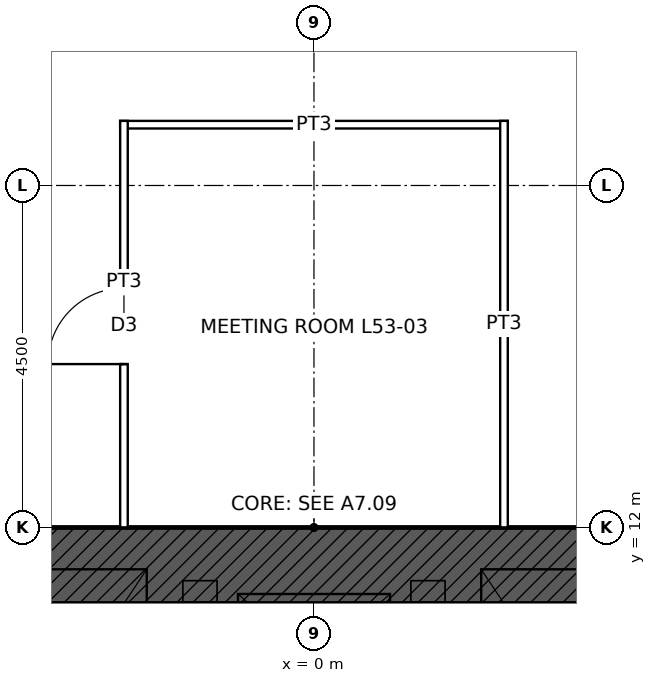
"""IFC4 building model, lengths in metres.
Left out: names, types, materials, properties, quantities, classifications, styles, units other than length and angle.
Written with IfcOpenShell. Run it as: python <this file> out.ifc"""

import sys

from ifc_helpers import new_model, si_unit, direction, frame, frame_2d, origin, place, context, subcontext, project, spatial, rectangle, extrude, element, fill, save


model = new_model("IFC4")
c1 = context("Model", 3, precision=1e-05, world=origin(), true_north=direction((0.0, 1.0)))
c2 = subcontext(c1, "Body", "Model", "MODEL_VIEW")
j1 = project(units=[si_unit("LENGTHUNIT", "METRE"), si_unit("PLANEANGLEUNIT", "RADIAN")], contexts=[c1])
p1 = place(None, origin())
s1 = spatial("IfcSite", under=j1, at=p1, CompositionType="ELEMENT")
p2 = place(p1, origin())
s2 = spatial("IfcBuilding", under=s1, at=p2, CompositionType="ELEMENT")
p3 = place(p2, frame((0.0, 0.0, 245.9)))
s3 = spatial("IfcBuildingStorey", under=s2, at=p3, CompositionType="ELEMENT", Elevation=245.9)
p4 = place(p3, frame((-12.0, 11.5, 0.0), z_axis=(0.0, 0.0, 1.0), x_axis=(1.0, 0.0, 0.0)))
e1 = element("IfcWall", 1, at=p4, inside=s3, PredefinedType="SHEAR", context=c2, shape_type="SweptSolid", body=[
    extrude(rectangle(XDim=24.0, YDim=1.0, at=frame_2d((12.0, 0.0))), origin(), (0.0, 0.0, 1.0), 4.0),
])
p5 = place(p4, frame((6.25, 0.0, 0.0)))
e2 = element("IfcOpeningElement", 2, at=p5, cuts=e1, PredefinedType="OPENING", context=c2, shape_type="SweptSolid", body=[
    extrude(rectangle(XDim=1.0, YDim=2.4, at=frame_2d((0.5, 1.2))), frame((0.0, 0.51, 0.0), z_axis=(0.0, -1.0, 0.0), x_axis=(1.0, 0.0, 0.0)), (0.0, 0.0, 1.0), 1.02),
])
p6 = place(p4, frame((16.75, 0.0, 0.0)))
e3 = element("IfcOpeningElement", 3, at=p6, cuts=e1, PredefinedType="OPENING", context=c2, shape_type="SweptSolid", body=[
    extrude(rectangle(XDim=1.0, YDim=2.4, at=frame_2d((0.5, 1.2))), frame((0.0, 0.51, 0.0), z_axis=(0.0, -1.0, 0.0), x_axis=(1.0, 0.0, 0.0)), (0.0, 0.0, 1.0), 1.02),
])
p7 = place(p3, frame((-2.55, 17.3, 0.0), z_axis=(0.0, 0.0, 1.0), x_axis=(1.0, 0.0, 0.0)))
e4 = element("IfcWall", 4, at=p7, inside=s3, PredefinedType="PARTITIONING", context=c2, shape_type="SweptSolid", body=[
    extrude(rectangle(XDim=5.1, YDim=0.1, at=frame_2d((2.55, 0.0))), origin(), (0.0, 0.0, 1.0), 3.85),
])
p8 = place(p3, frame((-2.5, 12.0, 0.0), z_axis=(0.0, 0.0, 1.0), x_axis=(0.0, 1.0, 0.0)))
e5 = element("IfcWall", 5, at=p8, inside=s3, PredefinedType="PARTITIONING", context=c2, shape_type="SweptSolid", body=[
    extrude(rectangle(XDim=5.35, YDim=0.1, at=frame_2d((2.675, 0.0))), origin(), (0.0, 0.0, 1.0), 3.85),
])
p9 = place(p8, frame((2.15, 0.0, 0.0)))
e6 = element("IfcOpeningElement", 6, at=p9, cuts=e5, PredefinedType="OPENING", context=c2, shape_type="SweptSolid", body=[
    extrude(rectangle(XDim=1.0, YDim=2.1, at=frame_2d((0.5, 1.05))), frame((0.0, 0.06, 0.0), z_axis=(0.0, -1.0, 0.0), x_axis=(1.0, 0.0, 0.0)), (0.0, 0.0, 1.0), 0.12),
])
p10 = place(p3, frame((2.5, 12.0, 0.0), z_axis=(0.0, 0.0, 1.0), x_axis=(0.0, 1.0, 0.0)))
e7 = element("IfcWall", 7, at=p10, inside=s3, PredefinedType="PARTITIONING", context=c2, shape_type="SweptSolid", body=[
    extrude(rectangle(XDim=5.35, YDim=0.1, at=frame_2d((2.675, 0.0))), origin(), (0.0, 0.0, 1.0), 3.85),
])
p11 = place(p9, origin())
e8 = element("IfcDoor", 8, at=p11, inside=s3, OperationType="SINGLE_SWING_LEFT", PredefinedType="DOOR", context=c2, shape_type="SweptSolid", body=[
    extrude(rectangle(XDim=1.0, YDim=2.1, at=frame_2d((0.5, 1.05))), frame((0.0, 0.025, 0.0), z_axis=(0.0, -1.0, 0.0), x_axis=(1.0, 0.0, 0.0)), (0.0, 0.0, 1.0), 0.05),
])
fill(e6, e8)
save(model, sys.argv[1])
